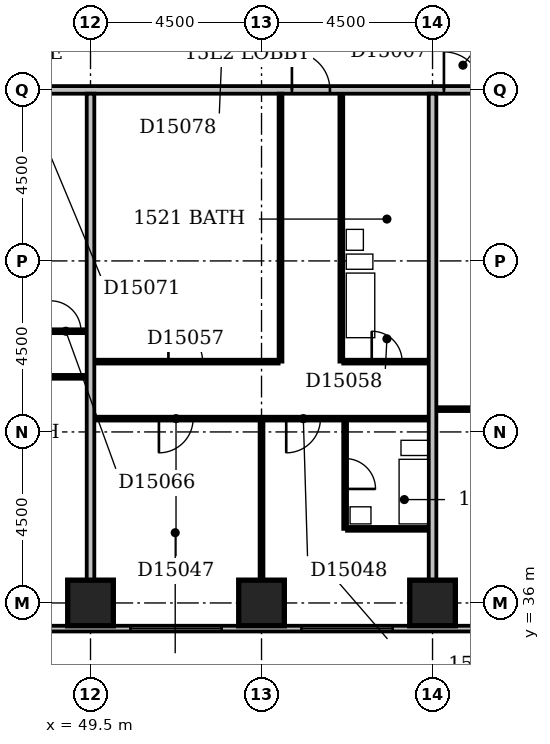
"""IFC4 building model, lengths in metres.
Left out: names, types, materials, properties, quantities, classifications, styles, units other than length and angle.
Written with IfcOpenShell. Run it as: python <this file> out.ifc"""

import sys

from ifc_helpers import new_model, si_unit, direction, frame, frame_2d, origin, origin_2d, place, context, subcontext, project, spatial, rectangle, extrude, element, fill, save


model = new_model("IFC4")
c1 = context("Model", 3, precision=1e-05, world=origin(), true_north=direction((0.0, 1.0)))
c2 = subcontext(c1, "Body", "Model", "MODEL_VIEW")
j1 = project(units=[si_unit("LENGTHUNIT", "METRE"), si_unit("PLANEANGLEUNIT", "RADIAN")], contexts=[c1])
p1 = place(None, origin())
s1 = spatial("IfcSite", under=j1, at=p1, CompositionType="ELEMENT")
p2 = place(p1, origin())
s2 = spatial("IfcBuilding", under=s1, at=p2, CompositionType="ELEMENT")
p3 = place(p2, frame((0.0, 0.0, 65.0)))
s3 = spatial("IfcBuildingStorey", under=s2, at=p3, CompositionType="ELEMENT", Elevation=65.0)
for number, where, z_axis, x_axis in (
    (1, (49.5, 36.0, -0.3), (0.0, 0.0, 1.0), (1.0, 0.0, 0.0)),
    (2, (54.0, 36.0, -0.3), (0.0, 0.0, 1.0), (1.0, 0.0, 0.0)),
    (3, (58.5, 36.0, -0.3), (0.0, 0.0, 1.0), (1.0, 0.0, 0.0)),
):
    element("IfcColumn", number, at=place(p3, frame(where, z_axis=z_axis, x_axis=x_axis)), inside=s3, PredefinedType="COLUMN", context=c2, shape_type="SweptSolid", body=[
        extrude(rectangle(XDim=1.2, YDim=1.2, at=origin_2d()), origin(), (0.0, 0.0, 1.0), 3.6),
    ])
p4 = place(p3, frame((23.1, 35.325, 0.0), z_axis=(0.0, 0.0, 1.0), x_axis=(1.0, 0.0, 0.0)))
e4 = element("IfcWall", 4, at=p4, inside=s3, PredefinedType="STANDARD", context=c2, shape_type="SweptSolid", body=[
    extrude(rectangle(XDim=45.15, YDim=0.15, at=frame_2d((22.575, 0.0))), origin(), (0.0, 0.0, 1.0), 2.7),
])
p5 = place(p4, frame((0.45, 0.0, 0.6)))
e5 = element("IfcOpeningElement", 5, at=p5, cuts=e4, PredefinedType="OPENING", context=c2, shape_type="SweptSolid", body=[
    extrude(rectangle(XDim=2.4, YDim=1.8, at=frame_2d((1.2, 0.9))), frame((0.0, 0.087, 0.0), z_axis=(0.0, -1.0, 0.0), x_axis=(1.0, 0.0, 0.0)), (0.0, 0.0, 1.0), 0.174),
])
p6 = place(p4, frame((4.95, 0.0, 0.6)))
e6 = element("IfcOpeningElement", 6, at=p6, cuts=e4, PredefinedType="OPENING", context=c2, shape_type="SweptSolid", body=[
    extrude(rectangle(XDim=2.4, YDim=1.8, at=frame_2d((1.2, 0.9))), frame((0.0, 0.087, 0.0), z_axis=(0.0, -1.0, 0.0), x_axis=(1.0, 0.0, 0.0)), (0.0, 0.0, 1.0), 0.174),
])
p7 = place(p4, frame((10.877, 0.0, 0.6)))
e7 = element("IfcOpeningElement", 7, at=p7, cuts=e4, PredefinedType="OPENING", context=c2, shape_type="SweptSolid", body=[
    extrude(rectangle(XDim=1.2, YDim=1.8, at=frame_2d((0.6, 0.9))), frame((0.0, 0.087, 0.0), z_axis=(0.0, -1.0, 0.0), x_axis=(1.0, 0.0, 0.0)), (0.0, 0.0, 1.0), 0.174),
])
p8 = place(p4, frame((13.823, 0.0, 0.6)))
e8 = element("IfcOpeningElement", 8, at=p8, cuts=e4, PredefinedType="OPENING", context=c2, shape_type="SweptSolid", body=[
    extrude(rectangle(XDim=1.2, YDim=1.8, at=frame_2d((0.6, 0.9))), frame((0.0, 0.087, 0.0), z_axis=(0.0, -1.0, 0.0), x_axis=(1.0, 0.0, 0.0)), (0.0, 0.0, 1.0), 0.174),
])
p9 = place(p4, frame((18.45, 0.0, 0.6)))
e9 = element("IfcOpeningElement", 9, at=p9, cuts=e4, PredefinedType="OPENING", context=c2, shape_type="SweptSolid", body=[
    extrude(rectangle(XDim=2.4, YDim=1.8, at=frame_2d((1.2, 0.9))), frame((0.0, 0.087, 0.0), z_axis=(0.0, -1.0, 0.0), x_axis=(1.0, 0.0, 0.0)), (0.0, 0.0, 1.0), 0.174),
])
p10 = place(p4, frame((22.95, 0.0, 0.6)))
e10 = element("IfcOpeningElement", 10, at=p10, cuts=e4, PredefinedType="OPENING", context=c2, shape_type="SweptSolid", body=[
    extrude(rectangle(XDim=2.4, YDim=1.8, at=frame_2d((1.2, 0.9))), frame((0.0, 0.087, 0.0), z_axis=(0.0, -1.0, 0.0), x_axis=(1.0, 0.0, 0.0)), (0.0, 0.0, 1.0), 0.174),
])
p11 = place(p4, frame((27.45, 0.0, 0.6)))
e11 = element("IfcOpeningElement", 11, at=p11, cuts=e4, PredefinedType="OPENING", context=c2, shape_type="SweptSolid", body=[
    extrude(rectangle(XDim=2.4, YDim=1.8, at=frame_2d((1.2, 0.9))), frame((0.0, 0.087, 0.0), z_axis=(0.0, -1.0, 0.0), x_axis=(1.0, 0.0, 0.0)), (0.0, 0.0, 1.0), 0.174),
])
p12 = place(p4, frame((31.95, 0.0, 0.6)))
e12 = element("IfcOpeningElement", 12, at=p12, cuts=e4, PredefinedType="OPENING", context=c2, shape_type="SweptSolid", body=[
    extrude(rectangle(XDim=2.4, YDim=1.8, at=frame_2d((1.2, 0.9))), frame((0.0, 0.087, 0.0), z_axis=(0.0, -1.0, 0.0), x_axis=(1.0, 0.0, 0.0)), (0.0, 0.0, 1.0), 0.174),
])
p13 = place(p4, frame((36.45, 0.0, 0.6)))
e13 = element("IfcOpeningElement", 13, at=p13, cuts=e4, PredefinedType="OPENING", context=c2, shape_type="SweptSolid", body=[
    extrude(rectangle(XDim=2.4, YDim=1.8, at=frame_2d((1.2, 0.9))), frame((0.0, 0.087, 0.0), z_axis=(0.0, -1.0, 0.0), x_axis=(1.0, 0.0, 0.0)), (0.0, 0.0, 1.0), 0.174),
])
p14 = place(p4, frame((41.403, 0.0, 0.6)))
e14 = element("IfcOpeningElement", 14, at=p14, cuts=e4, PredefinedType="OPENING", context=c2, shape_type="SweptSolid", body=[
    extrude(rectangle(XDim=2.1, YDim=1.8, at=frame_2d((1.05, 0.9))), frame((0.0, 0.087, 0.0), z_axis=(0.0, -1.0, 0.0), x_axis=(1.0, 0.0, 0.0)), (0.0, 0.0, 1.0), 0.174),
])
p15 = place(p3, frame((49.5, 36.6, 0.0), z_axis=(0.0, 0.0, 1.0), x_axis=(0.0, 1.0, 0.0)))
e15 = element("IfcWall", 15, at=p15, inside=s3, PredefinedType="PARTITIONING", context=c2, shape_type="SweptSolid", body=[
    extrude(rectangle(XDim=12.8, YDim=0.2, at=frame_2d((6.4, 0.0))), origin(), (0.0, 0.0, 1.0), 3.3),
])
p16 = place(p3, frame((54.0, 36.6, 0.0), z_axis=(0.0, 0.0, 1.0), x_axis=(0.0, 1.0, 0.0)))
e16 = element("IfcWall", 16, at=p16, inside=s3, PredefinedType="PARTITIONING", context=c2, shape_type="SweptSolid", body=[
    extrude(rectangle(XDim=4.2, YDim=0.1, at=frame_2d((2.1, 0.0))), origin(), (0.0, 0.0, 1.0), 2.6),
])
p17 = place(p3, frame((58.5, 36.6, 0.0), z_axis=(0.0, 0.0, 1.0), x_axis=(0.0, 1.0, 0.0)))
e17 = element("IfcWall", 17, at=p17, inside=s3, PredefinedType="PARTITIONING", context=c2, shape_type="SweptSolid", body=[
    extrude(rectangle(XDim=12.8, YDim=0.2, at=frame_2d((6.4, 0.0))), origin(), (0.0, 0.0, 1.0), 3.3),
])
p18 = place(p3, frame((56.2, 37.95, 0.0), z_axis=(0.0, 0.0, 1.0), x_axis=(0.0, 1.0, 0.0)))
e18 = element("IfcWall", 18, at=p18, inside=s3, PredefinedType="PLUMBINGWALL", context=c2, shape_type="SweptSolid", body=[
    extrude(rectangle(XDim=2.85, YDim=0.1, at=frame_2d((1.425, 0.0))), origin(), (0.0, 0.0, 1.0), 3.3),
])
p19 = place(p18, frame((1.05, 0.0, 0.0)))
e19 = element("IfcOpeningElement", 19, at=p19, cuts=e18, PredefinedType="OPENING", context=c2, shape_type="SweptSolid", body=[
    extrude(rectangle(XDim=0.8, YDim=2.1, at=frame_2d((0.4, 1.05))), frame((0.0, 0.062, 0.0), z_axis=(0.0, -1.0, 0.0), x_axis=(1.0, 0.0, 0.0)), (0.0, 0.0, 1.0), 0.124),
])
p20 = place(p3, frame((56.25, 37.95, 0.0), z_axis=(0.0, 0.0, 1.0), x_axis=(1.0, 0.0, 0.0)))
e20 = element("IfcWall", 20, at=p20, inside=s3, PredefinedType="PLUMBINGWALL", context=c2, shape_type="SweptSolid", body=[
    extrude(rectangle(XDim=2.15, YDim=0.1, at=frame_2d((1.075, 0.0))), origin(), (0.0, 0.0, 1.0), 3.3),
])
p21 = place(p3, frame((49.6, 40.85, 0.0), z_axis=(0.0, 0.0, 1.0), x_axis=(1.0, 0.0, 0.0)))
e21 = element("IfcWall", 21, at=p21, inside=s3, PredefinedType="PARTITIONING", context=c2, shape_type="SweptSolid", body=[
    extrude(rectangle(XDim=8.8, YDim=0.1, at=frame_2d((4.4, 0.0))), origin(), (0.0, 0.0, 1.0), 3.3),
])
p22 = place(p21, frame((1.7, 0.0, 0.0)))
e22 = element("IfcOpeningElement", 22, at=p22, cuts=e21, PredefinedType="OPENING", context=c2, shape_type="SweptSolid", body=[
    extrude(rectangle(XDim=0.9, YDim=2.1, at=frame_2d((0.45, 1.05))), frame((0.0, 0.062, 0.0), z_axis=(0.0, -1.0, 0.0), x_axis=(1.0, 0.0, 0.0)), (0.0, 0.0, 1.0), 0.124),
])
p23 = place(p21, frame((5.05, 0.0, 0.0)))
e23 = element("IfcOpeningElement", 23, at=p23, cuts=e21, PredefinedType="OPENING", context=c2, shape_type="SweptSolid", body=[
    extrude(rectangle(XDim=0.9, YDim=2.1, at=frame_2d((0.45, 1.05))), frame((0.0, 0.062, 0.0), z_axis=(0.0, -1.0, 0.0), x_axis=(1.0, 0.0, 0.0)), (0.0, 0.0, 1.0), 0.124),
])
p24 = place(p3, frame((58.6, 41.1, 0.0), z_axis=(0.0, 0.0, 1.0), x_axis=(1.0, 0.0, 0.0)))
e24 = element("IfcWall", 24, at=p24, inside=s3, PredefinedType="PARTITIONING", context=c2, shape_type="SweptSolid", body=[
    extrude(rectangle(XDim=8.3, YDim=0.1, at=frame_2d((4.15, 0.0))), origin(), (0.0, 0.0, 1.0), 3.3),
])
p25 = place(p24, frame((1.7, 0.0, 0.0)))
e25 = element("IfcOpeningElement", 25, at=p25, cuts=e24, PredefinedType="OPENING", context=c2, shape_type="SweptSolid", body=[
    extrude(rectangle(XDim=0.9, YDim=2.1, at=frame_2d((0.45, 1.05))), frame((0.0, 0.062, 0.0), z_axis=(0.0, -1.0, 0.0), x_axis=(1.0, 0.0, 0.0)), (0.0, 0.0, 1.0), 0.124),
])
p26 = place(p24, frame((7.3, 0.0, 0.0)))
e26 = element("IfcOpeningElement", 26, at=p26, cuts=e24, PredefinedType="OPENING", context=c2, shape_type="SweptSolid", body=[
    extrude(rectangle(XDim=0.9, YDim=2.1, at=frame_2d((0.45, 1.05))), frame((0.0, 0.062, 0.0), z_axis=(0.0, -1.0, 0.0), x_axis=(1.0, 0.0, 0.0)), (0.0, 0.0, 1.0), 0.124),
])
p27 = place(p3, frame((45.1, 41.95, 0.0), z_axis=(0.0, 0.0, 1.0), x_axis=(1.0, 0.0, 0.0)))
e27 = element("IfcWall", 27, at=p27, inside=s3, PredefinedType="PARTITIONING", context=c2, shape_type="SweptSolid", body=[
    extrude(rectangle(XDim=4.3, YDim=0.1, at=frame_2d((2.15, 0.0))), origin(), (0.0, 0.0, 1.0), 3.3),
])
p28 = place(p27, frame((1.7, 0.0, 0.0)))
e28 = element("IfcOpeningElement", 28, at=p28, cuts=e27, PredefinedType="OPENING", context=c2, shape_type="SweptSolid", body=[
    extrude(rectangle(XDim=0.9, YDim=2.1, at=frame_2d((0.45, 1.05))), frame((0.0, 0.062, 0.0), z_axis=(0.0, -1.0, 0.0), x_axis=(1.0, 0.0, 0.0)), (0.0, 0.0, 1.0), 0.124),
])
p29 = place(p3, frame((49.6, 42.35, 0.0), z_axis=(0.0, 0.0, 1.0), x_axis=(1.0, 0.0, 0.0)))
e29 = element("IfcWall", 29, at=p29, inside=s3, PredefinedType="PARTITIONING", context=c2, shape_type="SweptSolid", body=[
    extrude(rectangle(XDim=4.85, YDim=0.1, at=frame_2d((2.425, 0.0))), origin(), (0.0, 0.0, 1.0), 3.3),
])
p30 = place(p29, frame((1.95, 0.0, 0.0)))
e30 = element("IfcOpeningElement", 30, at=p30, cuts=e29, PredefinedType="OPENING", context=c2, shape_type="SweptSolid", body=[
    extrude(rectangle(XDim=0.9, YDim=2.1, at=frame_2d((0.45, 1.05))), frame((0.0, 0.062, 0.0), z_axis=(0.0, -1.0, 0.0), x_axis=(1.0, 0.0, 0.0)), (0.0, 0.0, 1.0), 0.124),
])
p31 = place(p3, frame((54.5, 42.35, 0.0), z_axis=(0.0, 0.0, 1.0), x_axis=(0.0, 1.0, 0.0)))
e31 = element("IfcWall", 31, at=p31, inside=s3, PredefinedType="PARTITIONING", context=c2, shape_type="SweptSolid", body=[
    extrude(rectangle(XDim=7.05, YDim=0.1, at=frame_2d((3.525, 0.0))), origin(), (0.0, 0.0, 1.0), 2.6),
])
p32 = place(p3, frame((56.1, 42.35, 0.0), z_axis=(0.0, 0.0, 1.0), x_axis=(0.0, 1.0, 0.0)))
e32 = element("IfcWall", 32, at=p32, inside=s3, PredefinedType="PLUMBINGWALL", context=c2, shape_type="SweptSolid", body=[
    extrude(rectangle(XDim=7.05, YDim=0.1, at=frame_2d((3.525, 0.0))), origin(), (0.0, 0.0, 1.0), 3.3),
])
p33 = place(p3, frame((56.15, 42.35, 0.0), z_axis=(0.0, 0.0, 1.0), x_axis=(1.0, 0.0, 0.0)))
e33 = element("IfcWall", 33, at=p33, inside=s3, PredefinedType="PARTITIONING", context=c2, shape_type="SweptSolid", body=[
    extrude(rectangle(XDim=2.25, YDim=0.1, at=frame_2d((1.125, 0.0))), origin(), (0.0, 0.0, 1.0), 3.3),
])
p34 = place(p33, frame((0.75, 0.0, 0.0)))
e34 = element("IfcOpeningElement", 34, at=p34, cuts=e33, PredefinedType="OPENING", context=c2, shape_type="SweptSolid", body=[
    extrude(rectangle(XDim=0.8, YDim=2.1, at=frame_2d((0.4, 1.05))), frame((0.0, 0.062, 0.0), z_axis=(0.0, -1.0, 0.0), x_axis=(1.0, 0.0, 0.0)), (0.0, 0.0, 1.0), 0.124),
])
p35 = place(p3, frame((48.25, 43.15, 0.0), z_axis=(0.0, 0.0, 1.0), x_axis=(1.0, 0.0, 0.0)))
e35 = element("IfcWall", 35, at=p35, inside=s3, PredefinedType="PARTITIONING", context=c2, shape_type="SweptSolid", body=[
    extrude(rectangle(XDim=1.15, YDim=0.1, at=frame_2d((0.575, 0.0))), origin(), (0.0, 0.0, 1.0), 3.3),
])
p36 = place(p35, frame((0.2, 0.0, 0.0)))
e36 = element("IfcOpeningElement", 36, at=p36, cuts=e35, PredefinedType="OPENING", context=c2, shape_type="SweptSolid", body=[
    extrude(rectangle(XDim=0.8, YDim=2.1, at=frame_2d((0.4, 1.05))), frame((0.0, 0.062, 0.0), z_axis=(0.0, -1.0, 0.0), x_axis=(1.0, 0.0, 0.0)), (0.0, 0.0, 1.0), 0.124),
])
p37 = place(p3, frame((9.1, 49.5, 0.0), z_axis=(0.0, 0.0, 1.0), x_axis=(1.0, 0.0, 0.0)))
e37 = element("IfcWall", 37, at=p37, inside=s3, PredefinedType="PARTITIONING", context=c2, shape_type="SweptSolid", body=[
    extrude(rectangle(XDim=57.8, YDim=0.2, at=frame_2d((28.9, 0.0))), origin(), (0.0, 0.0, 1.0), 3.3),
])
p38 = place(p37, frame((13.7, 0.0, 0.0)))
e38 = element("IfcOpeningElement", 38, at=p38, cuts=e37, PredefinedType="OPENING", context=c2, shape_type="SweptSolid", body=[
    extrude(rectangle(XDim=1.0, YDim=2.1, at=frame_2d((0.5, 1.05))), frame((0.0, 0.112, 0.0), z_axis=(0.0, -1.0, 0.0), x_axis=(1.0, 0.0, 0.0)), (0.0, 0.0, 1.0), 0.224),
])
p39 = place(p37, frame((32.2, 0.0, 0.0)))
e39 = element("IfcOpeningElement", 39, at=p39, cuts=e37, PredefinedType="OPENING", context=c2, shape_type="SweptSolid", body=[
    extrude(rectangle(XDim=1.0, YDim=2.1, at=frame_2d((0.5, 1.05))), frame((0.0, 0.112, 0.0), z_axis=(0.0, -1.0, 0.0), x_axis=(1.0, 0.0, 0.0)), (0.0, 0.0, 1.0), 0.224),
])
p40 = place(p37, frame((37.85, 0.0, 0.0)))
e40 = element("IfcOpeningElement", 40, at=p40, cuts=e37, PredefinedType="OPENING", context=c2, shape_type="SweptSolid", body=[
    extrude(rectangle(XDim=1.0, YDim=2.1, at=frame_2d((0.5, 1.05))), frame((0.0, 0.112, 0.0), z_axis=(0.0, -1.0, 0.0), x_axis=(1.0, 0.0, 0.0)), (0.0, 0.0, 1.0), 0.224),
])
p41 = place(p37, frame((45.7, 0.0, 0.0)))
e41 = element("IfcOpeningElement", 41, at=p41, cuts=e37, PredefinedType="OPENING", context=c2, shape_type="SweptSolid", body=[
    extrude(rectangle(XDim=1.0, YDim=2.1, at=frame_2d((0.5, 1.05))), frame((0.0, 0.112, 0.0), z_axis=(0.0, -1.0, 0.0), x_axis=(1.0, 0.0, 0.0)), (0.0, 0.0, 1.0), 0.224),
])
p42 = place(p37, frame((49.7, 0.0, 0.0)))
e42 = element("IfcOpeningElement", 42, at=p42, cuts=e37, PredefinedType="OPENING", context=c2, shape_type="SweptSolid", body=[
    extrude(rectangle(XDim=1.0, YDim=2.1, at=frame_2d((0.5, 1.05))), frame((0.0, 0.112, 0.0), z_axis=(0.0, -1.0, 0.0), x_axis=(1.0, 0.0, 0.0)), (0.0, 0.0, 1.0), 0.224),
])
p43 = place(p37, frame((8.4, 0.0, 0.0)))
e43 = element("IfcOpeningElement", 43, at=p43, cuts=e37, PredefinedType="OPENING", context=c2, shape_type="SweptSolid", body=[
    extrude(rectangle(XDim=0.9, YDim=2.1, at=frame_2d((0.45, 1.05))), frame((0.0, 0.112, 0.0), z_axis=(0.0, -1.0, 0.0), x_axis=(1.0, 0.0, 0.0)), (0.0, 0.0, 1.0), 0.224),
])
p44 = place(p11, origin())
e44 = element("IfcWindow", 44, at=p44, inside=s3, PartitioningType="SINGLE_PANEL", PredefinedType="WINDOW", context=c2, shape_type="SweptSolid", body=[
    extrude(rectangle(XDim=2.4, YDim=1.8, at=frame_2d((1.2, 0.9))), frame((0.0, 0.03, 0.0), z_axis=(0.0, -1.0, 0.0), x_axis=(1.0, 0.0, 0.0)), (0.0, 0.0, 1.0), 0.06),
])
fill(e11, e44)
p45 = place(p12, origin())
e45 = element("IfcWindow", 45, at=p45, inside=s3, PartitioningType="SINGLE_PANEL", PredefinedType="WINDOW", context=c2, shape_type="SweptSolid", body=[
    extrude(rectangle(XDim=2.4, YDim=1.8, at=frame_2d((1.2, 0.9))), frame((0.0, 0.03, 0.0), z_axis=(0.0, -1.0, 0.0), x_axis=(1.0, 0.0, 0.0)), (0.0, 0.0, 1.0), 0.06),
])
fill(e12, e45)
p46 = place(p19, frame((0.8, 0.0, 0.0), z_axis=(0.0, 0.0, 1.0), x_axis=(-1.0, 0.0, 0.0)))
e46 = element("IfcDoor", 46, at=p46, inside=s3, OperationType="SINGLE_SWING_RIGHT", PredefinedType="DOOR", context=c2, shape_type="SweptSolid", body=[
    extrude(rectangle(XDim=0.8, YDim=2.1, at=frame_2d((0.4, 1.05))), frame((0.0, 0.025, 0.0), z_axis=(0.0, -1.0, 0.0), x_axis=(1.0, 0.0, 0.0)), (0.0, 0.0, 1.0), 0.05),
])
fill(e19, e46)
p47 = place(p22, frame((0.9, 0.0, 0.0), z_axis=(0.0, 0.0, 1.0), x_axis=(-1.0, 0.0, 0.0)))
e47 = element("IfcDoor", 47, at=p47, inside=s3, OperationType="SINGLE_SWING_RIGHT", PredefinedType="DOOR", context=c2, shape_type="SweptSolid", body=[
    extrude(rectangle(XDim=0.9, YDim=2.1, at=frame_2d((0.45, 1.05))), frame((0.0, 0.025, 0.0), z_axis=(0.0, -1.0, 0.0), x_axis=(1.0, 0.0, 0.0)), (0.0, 0.0, 1.0), 0.05),
])
fill(e22, e47)
p48 = place(p23, frame((0.9, 0.0, 0.0), z_axis=(0.0, 0.0, 1.0), x_axis=(-1.0, 0.0, 0.0)))
e48 = element("IfcDoor", 48, at=p48, inside=s3, OperationType="SINGLE_SWING_RIGHT", PredefinedType="DOOR", context=c2, shape_type="SweptSolid", body=[
    extrude(rectangle(XDim=0.9, YDim=2.1, at=frame_2d((0.45, 1.05))), frame((0.0, 0.025, 0.0), z_axis=(0.0, -1.0, 0.0), x_axis=(1.0, 0.0, 0.0)), (0.0, 0.0, 1.0), 0.05),
])
fill(e23, e48)
p49 = place(p30, origin())
e49 = element("IfcDoor", 49, at=p49, inside=s3, OperationType="SINGLE_SWING_LEFT", PredefinedType="DOOR", context=c2, shape_type="SweptSolid", body=[
    extrude(rectangle(XDim=0.9, YDim=2.1, at=frame_2d((0.45, 1.05))), frame((0.0, 0.025, 0.0), z_axis=(0.0, -1.0, 0.0), x_axis=(1.0, 0.0, 0.0)), (0.0, 0.0, 1.0), 0.05),
])
fill(e30, e49)
p50 = place(p34, origin())
e50 = element("IfcDoor", 50, at=p50, inside=s3, OperationType="SINGLE_SWING_LEFT", PredefinedType="DOOR", context=c2, shape_type="SweptSolid", body=[
    extrude(rectangle(XDim=0.8, YDim=2.1, at=frame_2d((0.4, 1.05))), frame((0.0, 0.025, 0.0), z_axis=(0.0, -1.0, 0.0), x_axis=(1.0, 0.0, 0.0)), (0.0, 0.0, 1.0), 0.05),
])
fill(e34, e50)
p51 = place(p36, origin())
e51 = element("IfcDoor", 51, at=p51, inside=s3, OperationType="SINGLE_SWING_LEFT", PredefinedType="DOOR", context=c2, shape_type="SweptSolid", body=[
    extrude(rectangle(XDim=0.8, YDim=2.1, at=frame_2d((0.4, 1.05))), frame((0.0, 0.025, 0.0), z_axis=(0.0, -1.0, 0.0), x_axis=(1.0, 0.0, 0.0)), (0.0, 0.0, 1.0), 0.05),
])
fill(e36, e51)
p52 = place(p41, origin())
e52 = element("IfcDoor", 52, at=p52, inside=s3, OperationType="SINGLE_SWING_LEFT", PredefinedType="DOOR", context=c2, shape_type="SweptSolid", body=[
    extrude(rectangle(XDim=1.0, YDim=2.1, at=frame_2d((0.5, 1.05))), frame((0.0, 0.025, 0.0), z_axis=(0.0, -1.0, 0.0), x_axis=(1.0, 0.0, 0.0)), (0.0, 0.0, 1.0), 0.05),
])
fill(e41, e52)
p53 = place(p42, origin())
e53 = element("IfcDoor", 53, at=p53, inside=s3, OperationType="SINGLE_SWING_LEFT", PredefinedType="DOOR", context=c2, shape_type="SweptSolid", body=[
    extrude(rectangle(XDim=1.0, YDim=2.1, at=frame_2d((0.5, 1.05))), frame((0.0, 0.025, 0.0), z_axis=(0.0, -1.0, 0.0), x_axis=(1.0, 0.0, 0.0)), (0.0, 0.0, 1.0), 0.05),
])
fill(e42, e53)
save(model, sys.argv[1])
